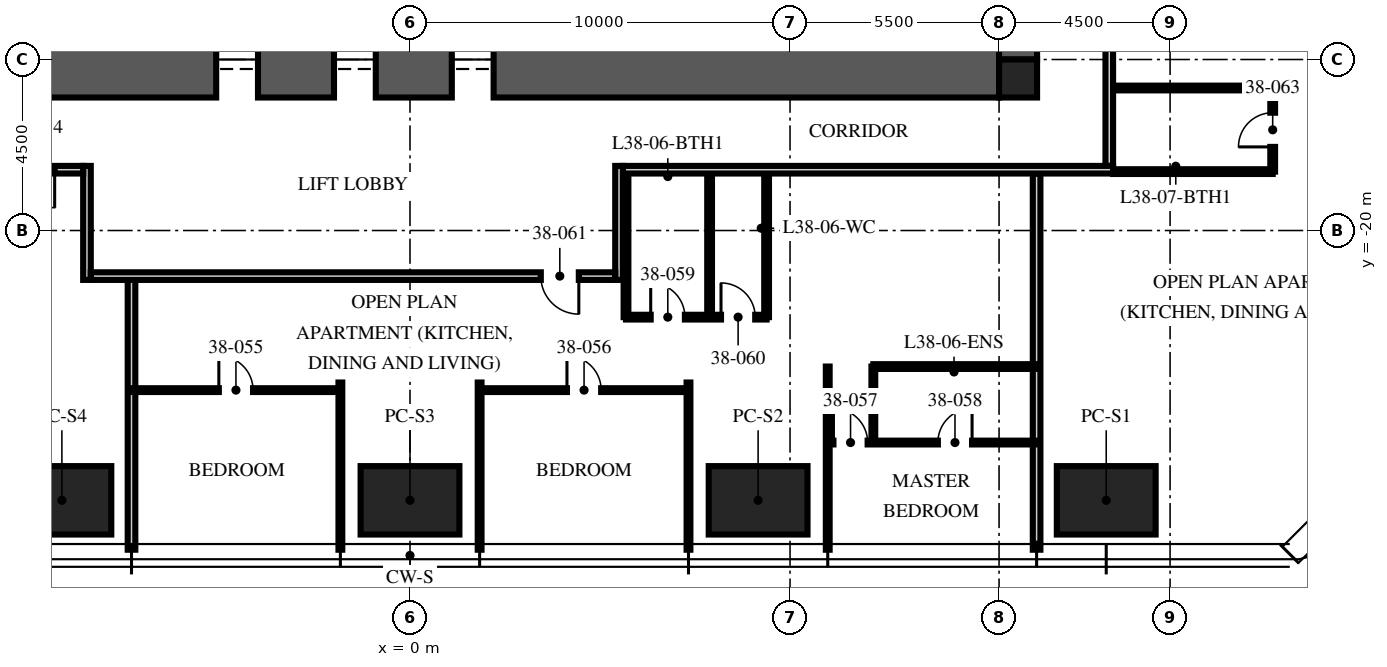
"""IFC4 building model, lengths in metres.
Left out: names, types, materials, properties, quantities, classifications, styles, units other than length and angle.
Written with IfcOpenShell. Run it as: python <this file> out.ifc"""

import sys

from ifc_helpers import new_model, si_unit, direction, frame, frame_2d, origin, origin_2d, place, context, subcontext, project, spatial, rectangle, extrude, element, fill, save


model = new_model("IFC4")
c1 = context("Model", 3, precision=1e-05, world=origin(), true_north=direction((0.0, 1.0)))
c2 = subcontext(c1, "Body", "Model", "MODEL_VIEW")
j1 = project(units=[si_unit("LENGTHUNIT", "METRE"), si_unit("PLANEANGLEUNIT", "RADIAN")], contexts=[c1])
p1 = place(None, origin())
s1 = spatial("IfcSite", under=j1, at=p1, CompositionType="ELEMENT")
p2 = place(p1, origin())
s2 = spatial("IfcBuilding", under=s1, at=p2, CompositionType="ELEMENT")
p3 = place(p2, frame((0.0, 0.0, 152.25)))
s3 = spatial("IfcBuildingStorey", under=s2, at=p3, CompositionType="ELEMENT", Elevation=152.25)
p4 = place(p3, frame((15.5, -15.5, -0.25), z_axis=(0.0, 0.0, 1.0), x_axis=(0.0, 1.0, 0.0)))
e1 = element("IfcWall", 1, at=p4, inside=s3, PredefinedType="SHEAR", context=c2, shape_type="SweptSolid", body=[
    extrude(rectangle(XDim=31.0, YDim=2.0, at=frame_2d((15.5, 0.0))), origin(), (0.0, 0.0, 1.0), 3.75),
])
p5 = place(p4, frame((6.5, 0.0, 0.25)))
e2 = element("IfcOpeningElement", 2, at=p5, cuts=e1, PredefinedType="OPENING", context=c2, shape_type="SweptSolid", body=[
    extrude(rectangle(XDim=1.2, YDim=2.1, at=frame_2d((0.6, 1.05))), frame((0.0, 1.01, 0.0), z_axis=(0.0, -1.0, 0.0), x_axis=(1.0, 0.0, 0.0)), (0.0, 0.0, 1.0), 2.02),
])
p6 = place(p4, frame((23.0, 0.0, 0.25)))
e3 = element("IfcOpeningElement", 3, at=p6, cuts=e1, PredefinedType="OPENING", context=c2, shape_type="SweptSolid", body=[
    extrude(rectangle(XDim=1.8, YDim=2.1, at=frame_2d((0.9, 1.05))), frame((0.0, 1.01, 0.0), z_axis=(0.0, -1.0, 0.0), x_axis=(1.0, 0.0, 0.0)), (0.0, 0.0, 1.0), 2.02),
])
p7 = place(p3, frame((-15.5, -15.5, -0.25), z_axis=(0.0, 0.0, 1.0), x_axis=(1.0, 0.0, 0.0)))
e4 = element("IfcWall", 4, at=p7, inside=s3, PredefinedType="SHEAR", context=c2, shape_type="SweptSolid", body=[
    extrude(rectangle(XDim=31.0, YDim=2.0, at=frame_2d((15.5, 0.0))), origin(), (0.0, 0.0, 1.0), 3.75),
])
p8 = place(p7, frame((10.4, 0.0, 0.25)))
e5 = element("IfcOpeningElement", 5, at=p8, cuts=e4, PredefinedType="OPENING", context=c2, shape_type="SweptSolid", body=[
    extrude(rectangle(XDim=1.1, YDim=2.1, at=frame_2d((0.55, 1.05))), frame((0.0, 1.01, 0.0), z_axis=(0.0, -1.0, 0.0), x_axis=(1.0, 0.0, 0.0)), (0.0, 0.0, 1.0), 2.02),
])
p9 = place(p7, frame((13.5, 0.0, 0.25)))
e6 = element("IfcOpeningElement", 6, at=p9, cuts=e4, PredefinedType="OPENING", context=c2, shape_type="SweptSolid", body=[
    extrude(rectangle(XDim=1.1, YDim=2.1, at=frame_2d((0.55, 1.05))), frame((0.0, 1.01, 0.0), z_axis=(0.0, -1.0, 0.0), x_axis=(1.0, 0.0, 0.0)), (0.0, 0.0, 1.0), 2.02),
])
p10 = place(p7, frame((16.6, 0.0, 0.25)))
e7 = element("IfcOpeningElement", 7, at=p10, cuts=e4, PredefinedType="OPENING", context=c2, shape_type="SweptSolid", body=[
    extrude(rectangle(XDim=1.1, YDim=2.1, at=frame_2d((0.55, 1.05))), frame((0.0, 1.01, 0.0), z_axis=(0.0, -1.0, 0.0), x_axis=(1.0, 0.0, 0.0)), (0.0, 0.0, 1.0), 2.02),
])
p11 = place(p3, frame((16.0, -16.0, -0.25), z_axis=(0.0, 0.0, 1.0), x_axis=(1.0, 0.0, 0.0)))
e8 = element("IfcColumn", 8, at=p11, inside=s3, PredefinedType="COLUMN", context=c2, shape_type="SweptSolid", body=[
    extrude(rectangle(XDim=1.0, YDim=1.0, at=origin_2d()), origin(), (0.0, 0.0, 1.0), 3.75),
])
for number, where, z_axis, x_axis in (
    (9, (18.32, -27.1, 0.0), (0.0, 0.0, 1.0), (1.0, 0.0, 0.0)),
    (10, (9.16, -27.1, 0.0), (0.0, 0.0, 1.0), (1.0, 0.0, 0.0)),
    (11, (0.0, -27.1, 0.0), (0.0, 0.0, 1.0), (1.0, 0.0, 0.0)),
    (12, (-9.16, -27.1, 0.0), (0.0, 0.0, 1.0), (1.0, 0.0, 0.0)),
):
    element("IfcColumn", number, at=place(p3, frame(where, z_axis=z_axis, x_axis=x_axis)), inside=s3, PredefinedType="COLUMN", context=c2, shape_type="SweptSolid", body=[
        extrude(rectangle(XDim=2.6, YDim=1.8, at=origin_2d()), origin(), (0.0, 0.0, 1.0), 3.75),
    ])
p12 = place(p3, frame((-7.328, -21.3, 0.0), z_axis=(0.0, 0.0, 1.0), x_axis=(0.0, -1.0, 0.0)))
e13 = element("IfcWall", 13, at=p12, inside=s3, PredefinedType="PARTITIONING", context=c2, shape_type="SweptSolid", body=[
    extrude(rectangle(XDim=7.1, YDim=0.2, at=frame_2d((3.55, 0.0))), origin(), (0.0, 0.0, 1.0), 2.81),
])
for number, where, z_axis, x_axis in (
    (14, (-1.832, -24.0, 0.0), (0.0, 0.0, 1.0), (0.0, -1.0, 0.0)),
    (15, (1.832, -24.0, 0.0), (0.0, 0.0, 1.0), (0.0, -1.0, 0.0)),
    (16, (7.328, -24.0, 0.0), (0.0, 0.0, 1.0), (0.0, -1.0, 0.0)),
):
    element("IfcWall", number, at=place(p3, frame(where, z_axis=z_axis, x_axis=x_axis)), inside=s3, PredefinedType="PARTITIONING", context=c2, shape_type="SweptSolid", body=[
        extrude(rectangle(XDim=4.4, YDim=0.1, at=frame_2d((2.2, 0.0))), origin(), (0.0, 0.0, 1.0), 2.81),
    ])
p13 = place(p3, frame((10.992, -23.58, 0.0), z_axis=(0.0, 0.0, 1.0), x_axis=(0.0, -1.0, 0.0)))
e17 = element("IfcWall", 17, at=p13, inside=s3, PredefinedType="PARTITIONING", context=c2, shape_type="SweptSolid", body=[
    extrude(rectangle(XDim=4.82, YDim=0.1, at=frame_2d((2.41, 0.0))), origin(), (0.0, 0.0, 1.0), 2.81),
])
p14 = place(p3, frame((16.488, -18.5, 0.0), z_axis=(0.0, 0.0, 1.0), x_axis=(0.0, -1.0, 0.0)))
e18 = element("IfcWall", 18, at=p14, inside=s3, PredefinedType="PARTITIONING", context=c2, shape_type="SweptSolid", body=[
    extrude(rectangle(XDim=9.9, YDim=0.2, at=frame_2d((4.95, 0.0))), origin(), (0.0, 0.0, 1.0), 2.81),
])
p15 = place(p3, frame((-7.328, -24.2, 0.0), z_axis=(0.0, 0.0, 1.0), x_axis=(1.0, 0.0, 0.0)))
e19 = element("IfcWall", 19, at=p15, inside=s3, PredefinedType="PARTITIONING", context=c2, shape_type="SweptSolid", body=[
    extrude(rectangle(XDim=5.496, YDim=0.1, at=frame_2d((2.748, 0.0))), origin(), (0.0, 0.0, 1.0), 2.81),
])
p16 = place(p15, frame((2.298, 0.0, 0.0)))
e20 = element("IfcOpeningElement", 20, at=p16, cuts=e19, PredefinedType="OPENING", context=c2, shape_type="SweptSolid", body=[
    extrude(rectangle(XDim=0.9, YDim=2.1, at=frame_2d((0.45, 1.05))), frame((0.0, 0.06, 0.0), z_axis=(0.0, -1.0, 0.0), x_axis=(1.0, 0.0, 0.0)), (0.0, 0.0, 1.0), 0.12),
])
p17 = place(p3, frame((1.832, -24.2, 0.0), z_axis=(0.0, 0.0, 1.0), x_axis=(1.0, 0.0, 0.0)))
e21 = element("IfcWall", 21, at=p17, inside=s3, PredefinedType="PARTITIONING", context=c2, shape_type="SweptSolid", body=[
    extrude(rectangle(XDim=5.496, YDim=0.1, at=frame_2d((2.748, 0.0))), origin(), (0.0, 0.0, 1.0), 2.81),
])
p18 = place(p17, frame((2.298, 0.0, 0.0)))
e22 = element("IfcOpeningElement", 22, at=p18, cuts=e21, PredefinedType="OPENING", context=c2, shape_type="SweptSolid", body=[
    extrude(rectangle(XDim=0.9, YDim=2.1, at=frame_2d((0.45, 1.05))), frame((0.0, 0.06, 0.0), z_axis=(0.0, -1.0, 0.0), x_axis=(1.0, 0.0, 0.0)), (0.0, 0.0, 1.0), 0.12),
])
p19 = place(p3, frame((10.992, -25.58, 0.0), z_axis=(0.0, 0.0, 1.0), x_axis=(1.0, 0.0, 0.0)))
e23 = element("IfcWall", 23, at=p19, inside=s3, PredefinedType="PARTITIONING", context=c2, shape_type="SweptSolid", body=[
    extrude(rectangle(XDim=5.496, YDim=0.1, at=frame_2d((2.748, 0.0))), origin(), (0.0, 0.0, 1.0), 2.81),
])
p20 = place(p19, frame((0.15, 0.0, 0.0)))
e24 = element("IfcOpeningElement", 24, at=p20, cuts=e23, PredefinedType="OPENING", context=c2, shape_type="SweptSolid", body=[
    extrude(rectangle(XDim=0.9, YDim=2.1, at=frame_2d((0.45, 1.05))), frame((0.0, 0.06, 0.0), z_axis=(0.0, -1.0, 0.0), x_axis=(1.0, 0.0, 0.0)), (0.0, 0.0, 1.0), 0.12),
])
p21 = place(p19, frame((2.898, 0.0, 0.0)))
e25 = element("IfcOpeningElement", 25, at=p21, cuts=e23, PredefinedType="OPENING", context=c2, shape_type="SweptSolid", body=[
    extrude(rectangle(XDim=0.9, YDim=2.1, at=frame_2d((0.45, 1.05))), frame((0.0, 0.06, 0.0), z_axis=(0.0, -1.0, 0.0), x_axis=(1.0, 0.0, 0.0)), (0.0, 0.0, 1.0), 0.12),
])
p22 = place(p3, frame((12.192, -23.58, 0.0), z_axis=(0.0, 0.0, 1.0), x_axis=(0.0, -1.0, 0.0)))
e26 = element("IfcWall", 26, at=p22, inside=s3, PredefinedType="PARTITIONING", context=c2, shape_type="SweptSolid", body=[
    extrude(rectangle(XDim=2.0, YDim=0.1, at=frame_2d((1.0, 0.0))), origin(), (0.0, 0.0, 1.0), 3.5),
])
p23 = place(p3, frame((12.192, -23.58, 0.0), z_axis=(0.0, 0.0, 1.0), x_axis=(1.0, 0.0, 0.0)))
e27 = element("IfcWall", 27, at=p23, inside=s3, PredefinedType="PARTITIONING", context=c2, shape_type="SweptSolid", body=[
    extrude(rectangle(XDim=4.296, YDim=0.125, at=frame_2d((2.148, 0.0))), origin(), (0.0, 0.0, 1.0), 2.81),
])
p24 = place(p3, frame((5.684, -22.28, 0.0), z_axis=(0.0, 0.0, 1.0), x_axis=(1.0, 0.0, 0.0)))
e28 = element("IfcWall", 28, at=p24, inside=s3, PredefinedType="PARTITIONING", context=c2, shape_type="SweptSolid", body=[
    extrude(rectangle(XDim=3.7, YDim=0.125, at=frame_2d((1.85, 0.0))), origin(), (0.0, 0.0, 1.0), 2.7),
])
p25 = place(p24, frame((0.65, 0.0, 0.0)))
e29 = element("IfcOpeningElement", 29, at=p25, cuts=e28, PredefinedType="OPENING", context=c2, shape_type="SweptSolid", body=[
    extrude(rectangle(XDim=0.9, YDim=2.1, at=frame_2d((0.45, 1.05))), frame((0.0, 0.073, 0.0), z_axis=(0.0, -1.0, 0.0), x_axis=(1.0, 0.0, 0.0)), (0.0, 0.0, 1.0), 0.145),
])
p26 = place(p24, frame((2.5, 0.0, 0.0)))
e30 = element("IfcOpeningElement", 30, at=p26, cuts=e28, PredefinedType="OPENING", context=c2, shape_type="SweptSolid", body=[
    extrude(rectangle(XDim=0.9, YDim=2.1, at=frame_2d((0.45, 1.05))), frame((0.0, 0.073, 0.0), z_axis=(0.0, -1.0, 0.0), x_axis=(1.0, 0.0, 0.0)), (0.0, 0.0, 1.0), 0.145),
])
for number, where, z_axis, x_axis in (
    (31, (5.684, -18.5, 0.0), (0.0, 0.0, 1.0), (0.0, -1.0, 0.0)),
    (32, (7.884, -18.5, 0.0), (0.0, 0.0, 1.0), (0.0, -1.0, 0.0)),
    (33, (9.384, -18.5, 0.0), (0.0, 0.0, 1.0), (0.0, -1.0, 0.0)),
):
    element("IfcWall", number, at=place(p3, frame(where, z_axis=z_axis, x_axis=x_axis)), inside=s3, PredefinedType="PARTITIONING", context=c2, shape_type="SweptSolid", body=[
        extrude(rectangle(XDim=3.78, YDim=0.125, at=frame_2d((1.89, 0.0))), origin(), (0.0, 0.0, 1.0), 3.5),
    ])
p27 = place(p3, frame((22.7, -18.45, 0.0), z_axis=(0.0, 0.0, 1.0), x_axis=(0.0, 1.0, 0.0)))
e34 = element("IfcWall", 34, at=p27, inside=s3, PredefinedType="PARTITIONING", context=c2, shape_type="SweptSolid", body=[
    extrude(rectangle(XDim=2.2, YDim=0.125, at=frame_2d((1.1, 0.0))), origin(), (0.0, 0.0, 1.0), 2.7),
])
p28 = place(p27, frame((0.65, 0.0, 0.0)))
e35 = element("IfcOpeningElement", 35, at=p28, cuts=e34, PredefinedType="OPENING", context=c2, shape_type="SweptSolid", body=[
    extrude(rectangle(XDim=0.9, YDim=2.1, at=frame_2d((0.45, 1.05))), frame((0.0, 0.073, 0.0), z_axis=(0.0, -1.0, 0.0), x_axis=(1.0, 0.0, 0.0)), (0.0, 0.0, 1.0), 0.145),
])
p29 = place(p3, frame((18.5, -18.45, 0.0), z_axis=(0.0, 0.0, 1.0), x_axis=(1.0, 0.0, 0.0)))
e36 = element("IfcWall", 36, at=p29, inside=s3, PredefinedType="PARTITIONING", context=c2, shape_type="SweptSolid", body=[
    extrude(rectangle(XDim=4.2, YDim=0.125, at=frame_2d((2.1, 0.0))), origin(), (0.0, 0.0, 1.0), 2.3),
])
p30 = place(p3, frame((18.5, -16.25, 0.0), z_axis=(0.0, 0.0, 1.0), x_axis=(1.0, 0.0, 0.0)))
e37 = element("IfcWall", 37, at=p30, inside=s3, PredefinedType="PARTITIONING", context=c2, shape_type="SweptSolid", body=[
    extrude(rectangle(XDim=4.2, YDim=0.125, at=frame_2d((2.1, 0.0))), origin(), (0.0, 0.0, 1.0), 3.5),
])
p31 = place(p3, frame((18.4, -18.3, 0.0), z_axis=(0.0, 0.0, 1.0), x_axis=(0.0, 1.0, 0.0)))
e38 = element("IfcWall", 38, at=p31, inside=s3, PredefinedType="PARTITIONING", context=c2, shape_type="SweptSolid", body=[
    extrude(rectangle(XDim=8.972, YDim=0.2, at=frame_2d((4.486, 0.0))), origin(), (0.0, 0.0, 1.0), 2.3),
])
p32 = place(p3, frame((18.5, -18.4, 0.0), z_axis=(0.0, 0.0, 1.0), x_axis=(-1.0, 0.0, 0.0)))
e39 = element("IfcWall", 39, at=p32, inside=s3, PredefinedType="PARTITIONING", context=c2, shape_type="SweptSolid", body=[
    extrude(rectangle(XDim=12.9, YDim=0.2, at=frame_2d((6.45, 0.0))), origin(), (0.0, 0.0, 1.0), 2.3),
])
for number, where, z_axis, x_axis in (
    (40, (5.5, -18.3, 0.0), (0.0, 0.0, 1.0), (0.0, -1.0, 0.0)),
    (41, (-8.5, -18.3, 0.0), (0.0, 0.0, 1.0), (0.0, -1.0, 0.0)),
):
    element("IfcWall", number, at=place(p3, frame(where, z_axis=z_axis, x_axis=x_axis)), inside=s3, PredefinedType="PARTITIONING", context=c2, shape_type="SweptSolid", body=[
        extrude(rectangle(XDim=3.0, YDim=0.2, at=frame_2d((1.5, 0.0))), origin(), (0.0, 0.0, 1.0), 3.5),
    ])
p33 = place(p3, frame((5.4, -21.2, 0.0), z_axis=(0.0, 0.0, 1.0), x_axis=(-1.0, 0.0, 0.0)))
e42 = element("IfcWall", 42, at=p33, inside=s3, PredefinedType="PARTITIONING", context=c2, shape_type="SweptSolid", body=[
    extrude(rectangle(XDim=13.8, YDim=0.2, at=frame_2d((6.9, 0.0))), origin(), (0.0, 0.0, 1.0), 2.7),
])
p34 = place(p33, frame((0.958, 0.0, 0.0)))
e43 = element("IfcOpeningElement", 43, at=p34, cuts=e42, PredefinedType="OPENING", context=c2, shape_type="SweptSolid", body=[
    extrude(rectangle(XDim=1.0, YDim=2.2, at=frame_2d((0.5, 1.1))), frame((0.0, 0.11, 0.0), z_axis=(0.0, -1.0, 0.0), x_axis=(1.0, 0.0, 0.0)), (0.0, 0.0, 1.0), 0.22),
])
p35 = place(p3, frame((-8.6, -18.4, 0.0), z_axis=(0.0, 0.0, 1.0), x_axis=(-1.0, 0.0, 0.0)))
e44 = element("IfcWall", 44, at=p35, inside=s3, PredefinedType="PARTITIONING", context=c2, shape_type="SweptSolid", body=[
    extrude(rectangle(XDim=9.9, YDim=0.2, at=frame_2d((4.95, 0.0))), origin(), (0.0, 0.0, 1.0), 2.3),
])
p36 = place(p35, frame((0.75, 0.0, 0.0)))
e45 = element("IfcOpeningElement", 45, at=p36, cuts=e44, PredefinedType="OPENING", context=c2, shape_type="SweptSolid", body=[
    extrude(rectangle(XDim=1.0, YDim=2.2, at=frame_2d((0.5, 1.1))), frame((0.0, 0.11, 0.0), z_axis=(0.0, -1.0, 0.0), x_axis=(1.0, 0.0, 0.0)), (0.0, 0.0, 1.0), 0.22),
])
p37 = place(p8, origin())
e46 = element("IfcDoor", 46, at=p37, inside=s3, OperationType="DOUBLE_DOOR_SLIDING", PredefinedType="DOOR", context=c2, shape_type="SweptSolid", body=[
    extrude(rectangle(XDim=1.1, YDim=2.1, at=frame_2d((0.55, 1.05))), frame((0.0, 0.025, 0.0), z_axis=(0.0, -1.0, 0.0), x_axis=(1.0, 0.0, 0.0)), (0.0, 0.0, 1.0), 0.05),
])
fill(e5, e46)
p38 = place(p9, origin())
e47 = element("IfcDoor", 47, at=p38, inside=s3, OperationType="DOUBLE_DOOR_SLIDING", PredefinedType="DOOR", context=c2, shape_type="SweptSolid", body=[
    extrude(rectangle(XDim=1.1, YDim=2.1, at=frame_2d((0.55, 1.05))), frame((0.0, 0.025, 0.0), z_axis=(0.0, -1.0, 0.0), x_axis=(1.0, 0.0, 0.0)), (0.0, 0.0, 1.0), 0.05),
])
fill(e6, e47)
p39 = place(p10, origin())
e48 = element("IfcDoor", 48, at=p39, inside=s3, OperationType="DOUBLE_DOOR_SLIDING", PredefinedType="DOOR", context=c2, shape_type="SweptSolid", body=[
    extrude(rectangle(XDim=1.1, YDim=2.1, at=frame_2d((0.55, 1.05))), frame((0.0, 0.025, 0.0), z_axis=(0.0, -1.0, 0.0), x_axis=(1.0, 0.0, 0.0)), (0.0, 0.0, 1.0), 0.05),
])
fill(e7, e48)
p40 = place(p36, origin())
e49 = element("IfcDoor", 49, at=p40, inside=s3, OperationType="SINGLE_SWING_LEFT", PredefinedType="DOOR", context=c2, shape_type="SweptSolid", body=[
    extrude(rectangle(XDim=1.0, YDim=2.2, at=frame_2d((0.5, 1.1))), frame((0.0, 0.025, 0.0), z_axis=(0.0, -1.0, 0.0), x_axis=(1.0, 0.0, 0.0)), (0.0, 0.0, 1.0), 0.05),
])
fill(e45, e49)
p41 = place(p16, origin())
e50 = element("IfcDoor", 50, at=p41, inside=s3, OperationType="SINGLE_SWING_LEFT", PredefinedType="DOOR", context=c2, shape_type="SweptSolid", body=[
    extrude(rectangle(XDim=0.9, YDim=2.1, at=frame_2d((0.45, 1.05))), frame((0.0, 0.025, 0.0), z_axis=(0.0, -1.0, 0.0), x_axis=(1.0, 0.0, 0.0)), (0.0, 0.0, 1.0), 0.05),
])
fill(e20, e50)
p42 = place(p18, origin())
e51 = element("IfcDoor", 51, at=p42, inside=s3, OperationType="SINGLE_SWING_LEFT", PredefinedType="DOOR", context=c2, shape_type="SweptSolid", body=[
    extrude(rectangle(XDim=0.9, YDim=2.1, at=frame_2d((0.45, 1.05))), frame((0.0, 0.025, 0.0), z_axis=(0.0, -1.0, 0.0), x_axis=(1.0, 0.0, 0.0)), (0.0, 0.0, 1.0), 0.05),
])
fill(e22, e51)
p43 = place(p20, origin())
e52 = element("IfcDoor", 52, at=p43, inside=s3, OperationType="SINGLE_SWING_LEFT", PredefinedType="DOOR", context=c2, shape_type="SweptSolid", body=[
    extrude(rectangle(XDim=0.9, YDim=2.1, at=frame_2d((0.45, 1.05))), frame((0.0, 0.025, 0.0), z_axis=(0.0, -1.0, 0.0), x_axis=(1.0, 0.0, 0.0)), (0.0, 0.0, 1.0), 0.05),
])
fill(e24, e52)
p44 = place(p21, origin())
e53 = element("IfcDoor", 53, at=p44, inside=s3, OperationType="SINGLE_SWING_RIGHT", PredefinedType="DOOR", context=c2, shape_type="SweptSolid", body=[
    extrude(rectangle(XDim=0.9, YDim=2.1, at=frame_2d((0.45, 1.05))), frame((0.0, 0.025, 0.0), z_axis=(0.0, -1.0, 0.0), x_axis=(1.0, 0.0, 0.0)), (0.0, 0.0, 1.0), 0.05),
])
fill(e25, e53)
p45 = place(p25, origin())
e54 = element("IfcDoor", 54, at=p45, inside=s3, OperationType="SINGLE_SWING_LEFT", PredefinedType="DOOR", context=c2, shape_type="SweptSolid", body=[
    extrude(rectangle(XDim=0.9, YDim=2.1, at=frame_2d((0.45, 1.05))), frame((0.0, 0.025, 0.0), z_axis=(0.0, -1.0, 0.0), x_axis=(1.0, 0.0, 0.0)), (0.0, 0.0, 1.0), 0.05),
])
fill(e29, e54)
p46 = place(p26, origin())
e55 = element("IfcDoor", 55, at=p46, inside=s3, OperationType="SINGLE_SWING_LEFT", PredefinedType="DOOR", context=c2, shape_type="SweptSolid", body=[
    extrude(rectangle(XDim=0.9, YDim=2.1, at=frame_2d((0.45, 1.05))), frame((0.0, 0.025, 0.0), z_axis=(0.0, -1.0, 0.0), x_axis=(1.0, 0.0, 0.0)), (0.0, 0.0, 1.0), 0.05),
])
fill(e30, e55)
p47 = place(p34, origin())
e56 = element("IfcDoor", 56, at=p47, inside=s3, OperationType="SINGLE_SWING_LEFT", PredefinedType="DOOR", context=c2, shape_type="SweptSolid", body=[
    extrude(rectangle(XDim=1.0, YDim=2.2, at=frame_2d((0.5, 1.1))), frame((0.0, 0.025, 0.0), z_axis=(0.0, -1.0, 0.0), x_axis=(1.0, 0.0, 0.0)), (0.0, 0.0, 1.0), 0.05),
])
fill(e43, e56)
p48 = place(p28, origin())
e57 = element("IfcDoor", 57, at=p48, inside=s3, OperationType="SINGLE_SWING_LEFT", PredefinedType="DOOR", context=c2, shape_type="SweptSolid", body=[
    extrude(rectangle(XDim=0.9, YDim=2.1, at=frame_2d((0.45, 1.05))), frame((0.0, 0.025, 0.0), z_axis=(0.0, -1.0, 0.0), x_axis=(1.0, 0.0, 0.0)), (0.0, 0.0, 1.0), 0.05),
])
fill(e35, e57)
save(model, sys.argv[1])
